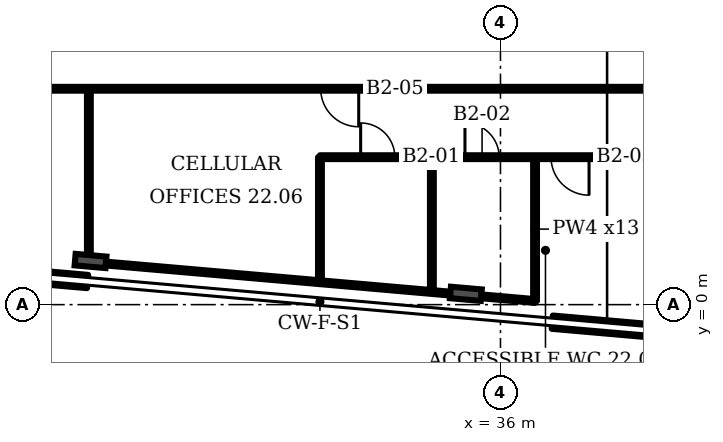
"""IFC4 building model, lengths in metres.
Left out: names, types, materials, properties, quantities, classifications, styles, units other than length and angle.
Written with IfcOpenShell. Run it as: python <this file> out.ifc"""

import sys

from ifc_helpers import new_model, si_unit, direction, frame, frame_2d, origin, origin_2d, place, context, subcontext, project, spatial, rectangle, i_section, extrude, element, fill, save


model = new_model("IFC4")
c1 = context("Model", 3, precision=1e-05, world=origin(), true_north=direction((0.0, 1.0)))
c2 = subcontext(c1, "Body", "Model", "MODEL_VIEW")
j1 = project(units=[si_unit("LENGTHUNIT", "METRE"), si_unit("PLANEANGLEUNIT", "RADIAN")], contexts=[c1])
p1 = place(None, origin())
s1 = spatial("IfcSite", under=j1, at=p1, CompositionType="ELEMENT")
p2 = place(p1, origin())
s2 = spatial("IfcBuilding", under=s1, at=p2, CompositionType="ELEMENT")
p3 = place(p2, frame((0.0, 0.0, 100.3)))
s3 = spatial("IfcBuildingStorey", under=s2, at=p3, CompositionType="ELEMENT", Elevation=100.3)
for number, where, z_axis, x_axis in (
    (1, (25.214, 1.149, 0.0), (0.0, 0.0, 1.0), (-0.087, -0.996, 0.0)),
    (2, (35.089, 0.285, 0.0), (0.0, 0.0, 1.0), (-0.087, -0.996, 0.0)),
):
    element("IfcColumn", number, at=place(p3, frame(where, z_axis=z_axis, x_axis=x_axis)), inside=s3, PredefinedType="COLUMN", context=c2, shape_type="SweptSolid", body=[
        extrude(i_section(OverallWidth=0.303, OverallDepth=0.814, WebThickness=0.021, FlangeThickness=0.04, FilletRadius=0.03, at=origin_2d()), origin(), (0.0, 0.0, 1.0), 3.6),
    ])
p4 = place(p3, frame((12.835, 1.685, 0.0), z_axis=(0.0, 0.0, 1.0), x_axis=(0.996192, -0.087173, 0.0)))
e3 = element("IfcWall", 3, at=p4, inside=s3, PredefinedType="SOLIDWALL", context=c2, shape_type="SweptSolid", body=[
    extrude(rectangle(XDim=12.348, YDim=0.35, at=frame_2d((6.174, 0.0))), origin(), (0.0, 0.0, 1.0), 1.0),
])
p5 = place(p3, frame((37.363, -0.461, 0.0), z_axis=(0.0, 0.0, 1.0), x_axis=(0.996194, -0.087159, 0.0)))
e4 = element("IfcWall", 4, at=p5, inside=s3, PredefinedType="SOLIDWALL", context=c2, shape_type="SweptSolid", body=[
    extrude(rectangle(XDim=12.199, YDim=0.35, at=frame_2d((6.099, 0.0))), origin(), (0.0, 0.0, 1.0), 1.0),
])
p6 = place(p3, frame((21.2, 5.68, 0.0), z_axis=(0.0, 0.0, 1.0), x_axis=(1.0, 0.0, 0.0)))
e5 = element("IfcWall", 5, at=p6, inside=s3, PredefinedType="PARTITIONING", context=c2, shape_type="SweptSolid", body=[
    extrude(rectangle(XDim=19.985, YDim=0.1, at=frame_2d((9.993, 0.0))), origin(), (0.0, 0.0, 1.0), 3.2),
])
p7 = place(p6, frame((0.13, 0.0, 0.0)))
e6 = element("IfcOpeningElement", 6, at=p7, cuts=e5, PredefinedType="OPENING", context=c2, shape_type="SweptSolid", body=[
    extrude(rectangle(XDim=1.0, YDim=2.1, at=frame_2d((0.5, 1.05))), frame((0.0, 0.06, 0.0), z_axis=(0.0, -1.0, 0.0), x_axis=(1.0, 0.0, 0.0)), (0.0, 0.0, 1.0), 0.12),
])
p8 = place(p6, frame((10.07, 0.0, 0.0)))
e7 = element("IfcOpeningElement", 7, at=p8, cuts=e5, PredefinedType="OPENING", context=c2, shape_type="SweptSolid", body=[
    extrude(rectangle(XDim=1.0, YDim=2.1, at=frame_2d((0.5, 1.05))), frame((0.0, 0.06, 0.0), z_axis=(0.0, -1.0, 0.0), x_axis=(1.0, 0.0, 0.0)), (0.0, 0.0, 1.0), 0.12),
])
p9 = place(p3, frame((25.17, 1.12, 0.0), z_axis=(0.0, 0.0, 1.0), x_axis=(0.0, 1.0, 0.0)))
e8 = element("IfcWall", 8, at=p9, inside=s3, PredefinedType="PARTITIONING", context=c2, shape_type="SweptSolid", body=[
    extrude(rectangle(XDim=4.56, YDim=0.1, at=frame_2d((2.28, 0.0))), origin(), (0.0, 0.0, 1.0), 3.2),
])
p10 = place(p3, frame((31.25, 0.59, 0.0), z_axis=(0.0, 0.0, 1.0), x_axis=(-0.996218, 0.086845, 0.0)))
e9 = element("IfcWall", 9, at=p10, inside=s3, PredefinedType="PARTITIONING", context=c2, shape_type="SweptSolid", body=[
    extrude(rectangle(XDim=6.103, YDim=0.1, at=frame_2d((3.052, 0.0))), origin(), (0.0, 0.0, 1.0), 2.58),
])
p11 = place(p3, frame((31.25, 0.59, 0.0), z_axis=(0.0, 0.0, 1.0), x_axis=(0.0, 1.0, 0.0)))
e10 = element("IfcWall", 10, at=p11, inside=s3, PredefinedType="PARTITIONING", context=c2, shape_type="SweptSolid", body=[
    extrude(rectangle(XDim=3.29, YDim=0.1, at=frame_2d((1.645, 0.0))), origin(), (0.0, 0.0, 1.0), 3.2),
])
p12 = place(p3, frame((31.25, 3.88, 0.0), z_axis=(0.0, 0.0, 1.0), x_axis=(1.0, 0.0, 0.0)))
e11 = element("IfcWall", 11, at=p12, inside=s3, PredefinedType="PARTITIONING", context=c2, shape_type="SweptSolid", body=[
    extrude(rectangle(XDim=9.935, YDim=0.1, at=frame_2d((4.968, 0.0))), origin(), (0.0, 0.0, 1.0), 3.2),
])
p13 = place(p12, frame((1.071, 0.0, 0.0)))
e12 = element("IfcOpeningElement", 12, at=p13, cuts=e11, PredefinedType="OPENING", context=c2, shape_type="SweptSolid", body=[
    extrude(rectangle(XDim=0.9, YDim=2.1, at=frame_2d((0.45, 1.05))), frame((0.0, 0.06, 0.0), z_axis=(0.0, -1.0, 0.0), x_axis=(1.0, 0.0, 0.0)), (0.0, 0.0, 1.0), 0.12),
])
p14 = place(p12, frame((3.816, 0.0, 0.0)))
e13 = element("IfcOpeningElement", 13, at=p14, cuts=e11, PredefinedType="OPENING", context=c2, shape_type="SweptSolid", body=[
    extrude(rectangle(XDim=0.9, YDim=2.1, at=frame_2d((0.45, 1.05))), frame((0.0, 0.06, 0.0), z_axis=(0.0, -1.0, 0.0), x_axis=(1.0, 0.0, 0.0)), (0.0, 0.0, 1.0), 0.12),
])
p15 = place(p12, frame((6.081, 0.0, 0.0)))
e14 = element("IfcOpeningElement", 14, at=p15, cuts=e11, PredefinedType="OPENING", context=c2, shape_type="SweptSolid", body=[
    extrude(rectangle(XDim=1.0, YDim=2.1, at=frame_2d((0.5, 1.05))), frame((0.0, 0.06, 0.0), z_axis=(0.0, -1.0, 0.0), x_axis=(1.0, 0.0, 0.0)), (0.0, 0.0, 1.0), 0.12),
])
p16 = place(p3, frame((34.195, 0.33, 0.0), z_axis=(0.0, 0.0, 1.0), x_axis=(0.0, 1.0, 0.0)))
e15 = element("IfcWall", 15, at=p16, inside=s3, PredefinedType="PARTITIONING", context=c2, shape_type="SweptSolid", body=[
    extrude(rectangle(XDim=3.55, YDim=0.1, at=frame_2d((1.775, 0.0))), origin(), (0.0, 0.0, 1.0), 3.2),
])
p17 = place(p3, frame((36.91, 0.095, 0.0), z_axis=(0.0, 0.0, 1.0), x_axis=(0.0, 1.0, 0.0)))
e16 = element("IfcWall", 16, at=p17, inside=s3, PredefinedType="PARTITIONING", context=c2, shape_type="SweptSolid", body=[
    extrude(rectangle(XDim=3.785, YDim=0.1, at=frame_2d((1.893, 0.0))), origin(), (0.0, 0.0, 1.0), 3.2),
])
p18 = place(p3, frame((36.91, 0.095, 0.0), z_axis=(0.0, 0.0, 1.0), x_axis=(-0.996195, 0.087145, 0.0)))
e17 = element("IfcWall", 17, at=p18, inside=s3, PredefinedType="PARTITIONING", context=c2, shape_type="SweptSolid", body=[
    extrude(rectangle(XDim=5.682, YDim=0.1, at=frame_2d((2.841, 0.0))), origin(), (0.0, 0.0, 1.0), 2.58),
])
p19 = place(p13, origin())
e18 = element("IfcDoor", 18, at=p19, inside=s3, OperationType="SINGLE_SWING_LEFT", PredefinedType="DOOR", context=c2, shape_type="SweptSolid", body=[
    extrude(rectangle(XDim=0.9, YDim=2.1, at=frame_2d((0.45, 1.05))), frame((0.0, 0.025, 0.0), z_axis=(0.0, -1.0, 0.0), x_axis=(1.0, 0.0, 0.0)), (0.0, 0.0, 1.0), 0.05),
])
fill(e12, e18)
p20 = place(p14, origin())
e19 = element("IfcDoor", 19, at=p20, inside=s3, OperationType="SINGLE_SWING_LEFT", PredefinedType="DOOR", context=c2, shape_type="SweptSolid", body=[
    extrude(rectangle(XDim=0.9, YDim=2.1, at=frame_2d((0.45, 1.05))), frame((0.0, 0.025, 0.0), z_axis=(0.0, -1.0, 0.0), x_axis=(1.0, 0.0, 0.0)), (0.0, 0.0, 1.0), 0.05),
])
fill(e13, e19)
p21 = place(p15, origin())
e20 = element("IfcDoor", 20, at=p21, inside=s3, OperationType="SINGLE_SWING_RIGHT", PredefinedType="DOOR", context=c2, shape_type="SweptSolid", body=[
    extrude(rectangle(XDim=1.0, YDim=2.1, at=frame_2d((0.5, 1.05))), frame((0.0, 0.025, 0.0), z_axis=(0.0, -1.0, 0.0), x_axis=(1.0, 0.0, 0.0)), (0.0, 0.0, 1.0), 0.05),
])
fill(e14, e20)
p22 = place(p8, origin())
e21 = element("IfcDoor", 21, at=p22, inside=s3, OperationType="SINGLE_SWING_RIGHT", PredefinedType="DOOR", context=c2, shape_type="SweptSolid", body=[
    extrude(rectangle(XDim=1.0, YDim=2.1, at=frame_2d((0.5, 1.05))), frame((0.0, 0.025, 0.0), z_axis=(0.0, -1.0, 0.0), x_axis=(1.0, 0.0, 0.0)), (0.0, 0.0, 1.0), 0.05),
])
fill(e7, e21)
save(model, sys.argv[1])
